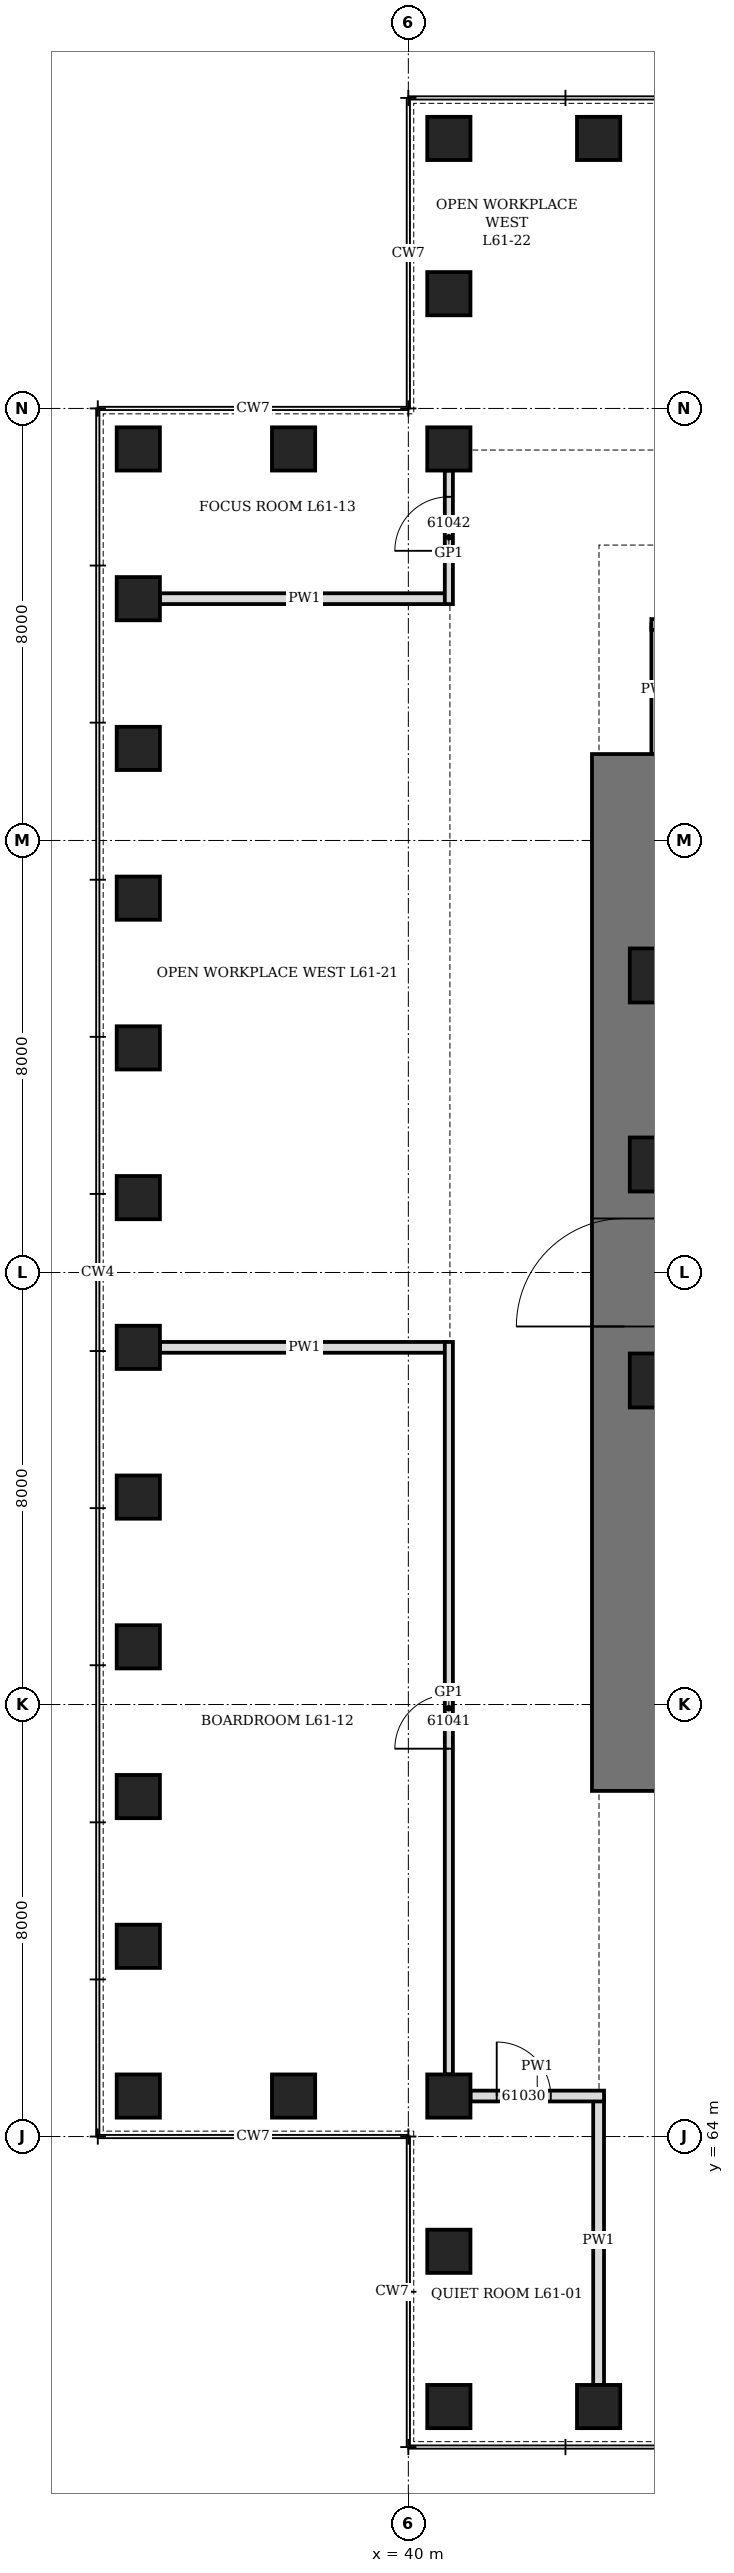
"""IFC4 building model, lengths in metres.
Left out: names, types, materials, properties, quantities, classifications, styles, units other than length and angle.
Written with IfcOpenShell. Run it as: python <this file> out.ifc"""

import sys

from ifc_helpers import new_model, si_unit, direction, frame, frame_2d, origin, origin_2d, place, context, subcontext, project, spatial, rectangle, hollow_rectangle, extrude, element, fill, save


model = new_model("IFC4")
c1 = context("Model", 3, precision=1e-05, world=origin(), true_north=direction((0.0, 1.0)))
c2 = subcontext(c1, "Body", "Model", "MODEL_VIEW")
j1 = project(units=[si_unit("LENGTHUNIT", "METRE"), si_unit("PLANEANGLEUNIT", "RADIAN")], contexts=[c1])
p1 = place(None, origin())
s1 = spatial("IfcSite", under=j1, at=p1, CompositionType="ELEMENT")
p2 = place(p1, origin())
s2 = spatial("IfcBuilding", under=s1, at=p2, CompositionType="ELEMENT")
p3 = place(p2, frame((0.0, 0.0, 271.3)))
s3 = spatial("IfcBuildingStorey", under=s2, at=p3, CompositionType="ELEMENT", Elevation=271.3)
for number, where, z_axis, x_axis in (
    (1, (40.75, 59.0, 0.0), (0.0, 0.0, 1.0), (1.0, 0.0, 0.0)),
    (2, (43.523, 59.0, 0.0), (0.0, 0.0, 1.0), (1.0, 0.0, 0.0)),
    (3, (43.523, 101.0, 0.0), (0.0, 0.0, 1.0), (1.0, 0.0, 0.0)),
    (4, (40.75, 101.0, 0.0), (0.0, 0.0, 1.0), (0.0, 1.0, 0.0)),
    (5, (40.75, 98.125, 0.0), (0.0, 0.0, 1.0), (0.0, 1.0, 0.0)),
    (6, (40.75, 95.25, 0.0), (0.0, 0.0, 1.0), (1.0, 0.0, 0.0)),
    (7, (37.875, 95.25, 0.0), (0.0, 0.0, 1.0), (1.0, 0.0, 0.0)),
    (8, (35.0, 95.25, 0.0), (0.0, 0.0, 1.0), (0.0, 1.0, 0.0)),
    (9, (35.0, 92.477, 0.0), (0.0, 0.0, 1.0), (0.0, 1.0, 0.0)),
    (10, (35.0, 89.705, 0.0), (0.0, 0.0, 1.0), (0.0, 1.0, 0.0)),
    (11, (35.0, 86.932, 0.0), (0.0, 0.0, 1.0), (0.0, 1.0, 0.0)),
    (12, (35.0, 84.159, 0.0), (0.0, 0.0, 1.0), (0.0, 1.0, 0.0)),
    (13, (35.0, 81.386, 0.0), (0.0, 0.0, 1.0), (0.0, 1.0, 0.0)),
    (14, (35.0, 78.614, 0.0), (0.0, 0.0, 1.0), (0.0, 1.0, 0.0)),
    (15, (35.0, 75.841, 0.0), (0.0, 0.0, 1.0), (0.0, 1.0, 0.0)),
    (16, (35.0, 73.068, 0.0), (0.0, 0.0, 1.0), (0.0, 1.0, 0.0)),
    (17, (35.0, 70.295, 0.0), (0.0, 0.0, 1.0), (0.0, 1.0, 0.0)),
    (18, (35.0, 67.523, 0.0), (0.0, 0.0, 1.0), (0.0, 1.0, 0.0)),
    (19, (35.0, 64.75, 0.0), (0.0, 0.0, 1.0), (1.0, 0.0, 0.0)),
    (20, (37.875, 64.75, 0.0), (0.0, 0.0, 1.0), (1.0, 0.0, 0.0)),
    (21, (40.75, 64.75, 0.0), (0.0, 0.0, 1.0), (0.0, 1.0, 0.0)),
    (22, (40.75, 61.875, 0.0), (0.0, 0.0, 1.0), (0.0, 1.0, 0.0)),
):
    element("IfcColumn", number, at=place(p3, frame(where, z_axis=z_axis, x_axis=x_axis)), inside=s3, PredefinedType="COLUMN", context=c2, shape_type="SweptSolid", body=[
        extrude(hollow_rectangle(XDim=0.8, YDim=0.8, WallThickness=0.1, at=origin_2d()), origin(), (0.0, 0.0, 1.0), 4.2),
    ])
p4 = place(p3, frame((44.0, 70.4, 0.0), z_axis=(0.0, 0.0, 1.0), x_axis=(0.0, 1.0, 0.0)))
e23 = element("IfcWall", 23, at=p4, inside=s3, PredefinedType="SHEAR", context=c2, shape_type="SweptSolid", body=[
    extrude(rectangle(XDim=19.2, YDim=1.2, at=frame_2d((9.6, 0.0))), origin(), (0.0, 0.0, 1.0), 4.2),
])
p5 = place(p4, frame((8.6, 0.0, 0.0)))
e24 = element("IfcOpeningElement", 24, at=p5, cuts=e23, PredefinedType="OPENING", context=c2, shape_type="SweptSolid", body=[
    extrude(rectangle(XDim=2.0, YDim=2.4, at=frame_2d((1.0, 1.2))), frame((0.0, 0.61, 0.0), z_axis=(0.0, -1.0, 0.0), x_axis=(1.0, 0.0, 0.0)), (0.0, 0.0, 1.0), 1.22),
])
for number, where, z_axis, x_axis in (
    (25, (44.6, 78.0, 0.0), (0.0, 0.0, 1.0), (1.0, 0.0, 0.0)),
    (26, (44.6, 82.0, 0.0), (0.0, 0.0, 1.0), (1.0, 0.0, 0.0)),
    (27, (44.6, 85.5, 0.0), (0.0, 0.0, 1.0), (1.0, 0.0, 0.0)),
):
    element("IfcColumn", number, at=place(p3, frame(where, z_axis=z_axis, x_axis=x_axis)), inside=s3, PredefinedType="COLUMN", context=c2, shape_type="SweptSolid", body=[
        extrude(hollow_rectangle(XDim=1.0, YDim=1.0, WallThickness=0.15, at=origin_2d()), origin(), (0.0, 0.0, 1.0), 4.2),
    ])
for number, where, z_axis, x_axis in (
    (28, (43.523, 59.4, 0.0), (0.0, 0.0, 1.0), (0.0, 1.0, 0.0)),
    (29, (35.4, 78.614, 0.0), (0.0, 0.0, 1.0), (1.0, 0.0, 0.0)),
    (30, (35.4, 92.477, 0.0), (0.0, 0.0, 1.0), (1.0, 0.0, 0.0)),
):
    element("IfcWall", number, at=place(p3, frame(where, z_axis=z_axis, x_axis=x_axis)), inside=s3, PredefinedType="PARTITIONING", context=c2, shape_type="SweptSolid", body=[
        extrude(rectangle(XDim=5.35, YDim=0.2, at=frame_2d((2.675, 0.0))), origin(), (0.0, 0.0, 1.0), 3.428),
    ])
p6 = place(p3, frame((44.6, 89.6, 0.0), z_axis=(0.0, 0.0, 1.0), x_axis=(0.0, 1.0, 0.0)))
e31 = element("IfcWall", 31, at=p6, inside=s3, PredefinedType="PARTITIONING", context=c2, shape_type="SweptSolid", body=[
    extrude(rectangle(XDim=2.4, YDim=0.2, at=frame_2d((1.2, 0.0))), origin(), (0.0, 0.0, 1.0), 4.04),
])
p7 = place(p3, frame((41.15, 64.75, 0.0), z_axis=(0.0, 0.0, 1.0), x_axis=(1.0, 0.0, 0.0)))
e32 = element("IfcWall", 32, at=p7, inside=s3, PredefinedType="PARTITIONING", context=c2, shape_type="SweptSolid", body=[
    extrude(rectangle(XDim=2.473, YDim=0.2, at=frame_2d((1.236, 0.0))), origin(), (0.0, 0.0, 1.0), 4.04),
])
p8 = place(p7, frame((0.486, 0.0, 0.0)))
e33 = element("IfcOpeningElement", 33, at=p8, cuts=e32, PredefinedType="OPENING", context=c2, shape_type="SweptSolid", body=[
    extrude(rectangle(XDim=1.0, YDim=2.1, at=frame_2d((0.5, 1.05))), frame((0.0, 0.11, 0.0), z_axis=(0.0, -1.0, 0.0), x_axis=(1.0, 0.0, 0.0)), (0.0, 0.0, 1.0), 0.22),
])
p9 = place(p3, frame((44.5, 92.0, 0.0), z_axis=(0.0, 0.0, 1.0), x_axis=(1.0, 0.0, 0.0)))
e34 = element("IfcWall", 34, at=p9, inside=s3, PredefinedType="PARTITIONING", context=c2, shape_type="SweptSolid", body=[
    extrude(rectangle(XDim=6.4, YDim=0.2, at=frame_2d((3.2, 0.0))), origin(), (0.0, 0.0, 1.0), 4.04),
])
p10 = place(p9, frame((2.7, 0.0, 0.0)))
e35 = element("IfcOpeningElement", 35, at=p10, cuts=e34, PredefinedType="OPENING", context=c2, shape_type="SweptSolid", body=[
    extrude(rectangle(XDim=1.0, YDim=2.1, at=frame_2d((0.5, 1.05))), frame((0.0, 0.11, 0.0), z_axis=(0.0, -1.0, 0.0), x_axis=(1.0, 0.0, 0.0)), (0.0, 0.0, 1.0), 0.22),
])
p11 = place(p3, frame((40.75, 65.15, 0.0), z_axis=(0.0, 0.0, 1.0), x_axis=(0.0, 1.0, 0.0)))
e36 = element("IfcWall", 36, at=p11, inside=s3, PredefinedType="PARTITIONING", context=c2, shape_type="SweptSolid", body=[
    extrude(rectangle(XDim=13.564, YDim=0.15, at=frame_2d((6.782, 0.0))), origin(), (0.0, 0.0, 1.0), 4.04),
])
p12 = place(p11, frame((6.032, 0.0, 0.0)))
e37 = element("IfcOpeningElement", 37, at=p12, cuts=e36, PredefinedType="OPENING", context=c2, shape_type="SweptSolid", body=[
    extrude(rectangle(XDim=1.0, YDim=2.4, at=frame_2d((0.5, 1.2))), frame((0.0, 0.085, 0.0), z_axis=(0.0, -1.0, 0.0), x_axis=(1.0, 0.0, 0.0)), (0.0, 0.0, 1.0), 0.17),
])
p13 = place(p3, frame((40.75, 92.377, 0.0), z_axis=(0.0, 0.0, 1.0), x_axis=(0.0, 1.0, 0.0)))
e38 = element("IfcWall", 38, at=p13, inside=s3, PredefinedType="PARTITIONING", context=c2, shape_type="SweptSolid", body=[
    extrude(rectangle(XDim=2.473, YDim=0.15, at=frame_2d((1.236, 0.0))), origin(), (0.0, 0.0, 1.0), 4.04),
])
p14 = place(p13, frame((0.986, 0.0, 0.0)))
e39 = element("IfcOpeningElement", 39, at=p14, cuts=e38, PredefinedType="OPENING", context=c2, shape_type="SweptSolid", body=[
    extrude(rectangle(XDim=1.0, YDim=2.4, at=frame_2d((0.5, 1.2))), frame((0.0, 0.085, 0.0), z_axis=(0.0, -1.0, 0.0), x_axis=(1.0, 0.0, 0.0)), (0.0, 0.0, 1.0), 0.17),
])
p15 = place(p5, origin())
e40 = element("IfcDoor", 40, at=p15, inside=s3, OperationType="DOUBLE_DOOR_SINGLE_SWING", PredefinedType="DOOR", context=c2, shape_type="SweptSolid", body=[
    extrude(rectangle(XDim=2.0, YDim=2.4, at=frame_2d((1.0, 1.2))), frame((0.0, 0.35, 0.0), z_axis=(0.0, -1.0, 0.0), x_axis=(1.0, 0.0, 0.0)), (0.0, 0.0, 1.0), 0.7),
])
fill(e24, e40)
p16 = place(p8, origin())
e41 = element("IfcDoor", 41, at=p16, inside=s3, OperationType="SINGLE_SWING_LEFT", PredefinedType="DOOR", context=c2, shape_type="SweptSolid", body=[
    extrude(rectangle(XDim=1.0, YDim=2.1, at=frame_2d((0.5, 1.05))), frame((0.0, 0.1, 0.0), z_axis=(0.0, -1.0, 0.0), x_axis=(1.0, 0.0, 0.0)), (0.0, 0.0, 1.0), 0.199),
])
fill(e33, e41)
p17 = place(p12, origin())
e42 = element("IfcDoor", 42, at=p17, inside=s3, OperationType="SINGLE_SWING_RIGHT", PredefinedType="DOOR", context=c2, shape_type="SweptSolid", body=[
    extrude(rectangle(XDim=1.0, YDim=2.4, at=frame_2d((0.5, 1.2))), frame((0.0, 0.075, 0.0), z_axis=(0.0, -1.0, 0.0), x_axis=(1.0, 0.0, 0.0)), (0.0, 0.0, 1.0), 0.149),
])
fill(e37, e42)
p18 = place(p14, origin())
e43 = element("IfcDoor", 43, at=p18, inside=s3, OperationType="SINGLE_SWING_RIGHT", PredefinedType="DOOR", context=c2, shape_type="SweptSolid", body=[
    extrude(rectangle(XDim=1.0, YDim=2.4, at=frame_2d((0.5, 1.2))), frame((0.0, 0.075, 0.0), z_axis=(0.0, -1.0, 0.0), x_axis=(1.0, 0.0, 0.0)), (0.0, 0.0, 1.0), 0.149),
])
fill(e39, e43)
save(model, sys.argv[1])
